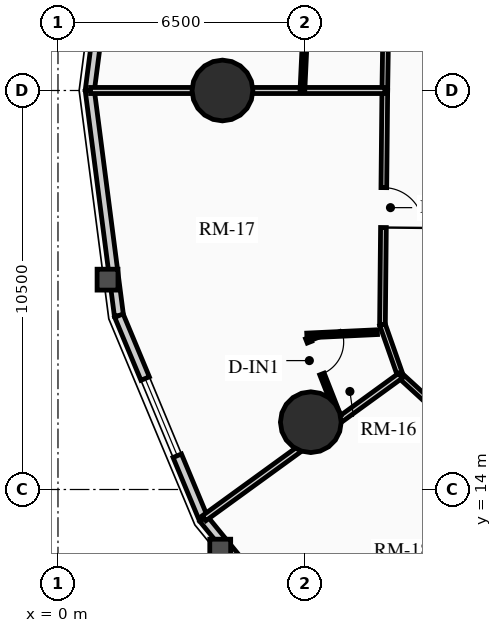
"""IFC4 building model, lengths in metres.
Left out: names, types, materials, properties, quantities, classifications, styles, units other than length and angle.
Written with IfcOpenShell. Run it as: python <this file> out.ifc"""

import sys

from ifc_helpers import new_model, si_unit, direction, frame, frame_2d, origin, origin_2d, place, context, subcontext, project, spatial, rectangle, circle, extrude, source, transform, mapped, element, fill, save


model = new_model("IFC4")
c1 = context("Model", 3, precision=1e-05, world=origin(), true_north=direction((0.0, 1.0)))
c2 = subcontext(c1, "Body", "Model", "MODEL_VIEW")
j1 = project(units=[si_unit("LENGTHUNIT", "METRE"), si_unit("PLANEANGLEUNIT", "RADIAN")], contexts=[c1])
p1 = place(None, origin())
s1 = spatial("IfcSite", under=j1, at=p1, CompositionType="ELEMENT")
p2 = place(p1, origin())
s2 = spatial("IfcBuilding", under=s1, at=p2, CompositionType="ELEMENT")
p3 = place(p2, frame((0.0, 0.0, 62.74)))
s3 = spatial("IfcBuildingStorey", under=s2, at=p3, CompositionType="ELEMENT", Elevation=62.74)
for number, where, z_axis, x_axis in (
    (1, (4.328, 24.5, 0.0), (0.0, 0.0, 1.0), (1.0, 0.0, 0.0)),
    (2, (6.653, 15.771, 0.0), (0.0, 0.0, 1.0), (1.0, 0.0, 0.0)),
):
    element("IfcColumn", number, at=place(p3, frame(where, z_axis=z_axis, x_axis=x_axis)), inside=s3, PredefinedType="USERDEFINED", context=c2, shape_type="SweptSolid", body=[
        extrude(circle(Radius=0.8, at=origin_2d()), origin(), (0.0, 0.0, 1.0), 2.91),
    ])
p4 = place(p3, frame((0.837, 24.5, 0.0), z_axis=(0.0, 0.0, 1.0), x_axis=(0.128339641463, 0.991730274031, 0.0)))
e3 = element("IfcWall", 3, at=p4, inside=s3, PredefinedType="SOLIDWALL", context=c2, shape_type="SweptSolid", body=[
    extrude(rectangle(XDim=5.973, YDim=0.24, at=frame_2d((2.987, 0.0))), origin(), (0.0, 0.0, 1.0), 2.079),
])
m1 = source(origin(), c2, "Body", "SweptSolid", [
    extrude(rectangle(XDim=1.9, YDim=1.35, at=frame_2d((0.95, 0.675))), frame((0.0, 0.13, 0.0), z_axis=(0.0, -1.0, 0.0), x_axis=(1.0, 0.0, 0.0)), (0.0, 0.0, 1.0), 0.26),
])
p5 = place(p4, frame((2.037, 0.0, 0.65)))
e4 = element("IfcOpeningElement", 4, at=p5, cuts=e3, PredefinedType="OPENING", context=c2, shape_type="MappedRepresentation", body=[
    mapped(m1, transform((0.0, 0.0, 0.0), x_axis=(1.0, 0.0, 0.0), y_axis=(0.0, 1.0, 0.0), z_axis=(0.0, 0.0, 1.0), scale=1.0)),
])
p6 = place(p3, frame((1.604, 18.576, 0.0), z_axis=(0.0, 0.0, 1.0), x_axis=(-0.128339641463, 0.991730274031, 0.0)))
e5 = element("IfcWall", 5, at=p6, inside=s3, PredefinedType="SOLIDWALL", context=c2, shape_type="SweptSolid", body=[
    extrude(rectangle(XDim=5.973, YDim=0.24, at=frame_2d((2.987, 0.0))), origin(), (0.0, 0.0, 1.0), 2.079),
])
p7 = place(p3, frame((3.828, 13.232, 0.0), z_axis=(0.0, 0.0, 1.0), x_axis=(-0.384348836956, 0.923187939442, 0.0)))
e6 = element("IfcWall", 6, at=p7, inside=s3, PredefinedType="SOLIDWALL", context=c2, shape_type="SweptSolid", body=[
    extrude(rectangle(XDim=5.789, YDim=0.24, at=frame_2d((2.894, 0.0))), origin(), (0.0, 0.0, 1.0), 2.079),
])
m2 = source(origin(), c2, "Body", "SweptSolid", [
    extrude(rectangle(XDim=2.2, YDim=1.35, at=frame_2d((1.1, 0.675))), frame((0.0, 0.13, 0.0), z_axis=(0.0, -1.0, 0.0), x_axis=(1.0, 0.0, 0.0)), (0.0, 0.0, 1.0), 0.26),
])
p8 = place(p7, frame((1.794, 0.0, 0.65)))
e7 = element("IfcOpeningElement", 7, at=p8, cuts=e6, PredefinedType="OPENING", context=c2, shape_type="MappedRepresentation", body=[
    mapped(m2, transform((0.0, 0.0, 0.0), x_axis=(1.0, 0.0, 0.0), y_axis=(0.0, 1.0, 0.0), z_axis=(0.0, 0.0, 1.0), scale=1.0)),
])
p9 = place(p3, frame((7.293, 8.991, 0.0), z_axis=(0.0, 0.0, 1.0), x_axis=(-0.632713287022, 0.77438614168, 0.0)))
e8 = element("IfcWall", 8, at=p9, inside=s3, PredefinedType="SOLIDWALL", context=c2, shape_type="SweptSolid", body=[
    extrude(rectangle(XDim=5.477, YDim=0.24, at=frame_2d((2.738, 0.0))), origin(), (0.0, 0.0, 1.0), 2.079),
])
p10 = place(p3, frame((8.693, 30.544, 0.0), z_axis=(0.0, 0.0, 1.0), x_axis=(-0.015307007986, -0.99988284089, 0.0)))
e9 = element("IfcWall", 9, at=p10, inside=s3, PredefinedType="PARTITIONING", context=c2, shape_type="SweptSolid", body=[
    extrude(rectangle(XDim=6.045, YDim=0.15, at=frame_2d((3.022, 0.0))), origin(), (0.0, 0.0, 1.0), 2.555),
])
p11 = place(p3, frame((8.6, 24.5, 0.0), z_axis=(0.0, 0.0, 1.0), x_axis=(-0.010023665349, -0.999949761805, 0.0)))
e10 = element("IfcWall", 10, at=p11, inside=s3, PredefinedType="PARTITIONING", context=c2, shape_type="SweptSolid", body=[
    extrude(rectangle(XDim=6.162, YDim=0.15, at=frame_2d((3.081, 0.0))), origin(), (0.0, 0.0, 1.0), 2.079),
])
m3 = source(origin(), c2, "Body", "SweptSolid", [
    extrude(rectangle(XDim=1.05, YDim=2.015, at=frame_2d((0.525, 1.007))), frame((0.0, 0.085, 0.0), z_axis=(0.0, -1.0, 0.0), x_axis=(1.0, 0.0, 0.0)), (0.0, 0.0, 1.0), 0.17),
])
p12 = place(p11, frame((2.556, 0.0, 0.0)))
e11 = element("IfcOpeningElement", 11, at=p12, cuts=e10, PredefinedType="OPENING", context=c2, shape_type="MappedRepresentation", body=[
    mapped(m3, transform((0.0, 0.0, 0.0), x_axis=(1.0, 0.0, 0.0), y_axis=(0.0, 1.0, 0.0), z_axis=(0.0, 0.0, 1.0), scale=1.0)),
])
p13 = place(p3, frame((8.538, 18.338, 0.0), z_axis=(0.0, 0.0, 1.0), x_axis=(0.331358150167, -0.94350504838, 0.0)))
e12 = element("IfcWall", 12, at=p13, inside=s3, PredefinedType="PARTITIONING", context=c2, shape_type="SweptSolid", body=[
    extrude(rectangle(XDim=1.424, YDim=0.15, at=frame_2d((0.712, 0.0))), origin(), (0.0, 0.0, 1.0), 2.125),
])
p14 = place(p3, frame((9.01, 16.994, 0.0), z_axis=(0.0, 0.0, 1.0), x_axis=(0.737701798986, -0.67512669609, 0.0)))
e13 = element("IfcWall", 13, at=p14, inside=s3, PredefinedType="PARTITIONING", context=c2, shape_type="SweptSolid", body=[
    extrude(rectangle(XDim=1.498, YDim=0.15, at=frame_2d((0.749, 0.0))), origin(), (0.0, 0.0, 1.0), 2.079),
])
p15 = place(p3, frame((8.6, 24.5, 0.0), z_axis=(0.0, 0.0, 1.0), x_axis=(-1.0, 0.0, 0.0)))
e14 = element("IfcWall", 14, at=p15, inside=s3, PredefinedType="PARTITIONING", context=c2, shape_type="SweptSolid", body=[
    extrude(rectangle(XDim=7.743, YDim=0.16, at=frame_2d((3.872, 0.0))), origin(), (0.0, 0.0, 1.0), 2.079),
])
p16 = place(p3, frame((9.01, 16.994, 0.0), z_axis=(0.0, 0.0, 1.0), x_axis=(-0.809215422166, -0.58751204288, 0.0)))
e15 = element("IfcWall", 15, at=p16, inside=s3, PredefinedType="PARTITIONING", context=c2, shape_type="SweptSolid", body=[
    extrude(rectangle(XDim=6.384, YDim=0.16, at=frame_2d((3.192, 0.0))), origin(), (0.0, 0.0, 1.0), 2.079),
])
p17 = place(p3, frame((6.713, 30.509, 0.0), z_axis=(0.0, 0.0, 1.0), x_axis=(-0.046755247216, -0.998906375422, 0.0)))
e16 = element("IfcWall", 16, at=p17, inside=s3, PredefinedType="PARTITIONING", context=c2, shape_type="SweptSolid", body=[
    extrude(rectangle(XDim=6.015, YDim=0.125, at=frame_2d((3.008, 0.0))), origin(), (0.0, 0.0, 1.0), 2.555),
])
p18 = place(p3, frame((8.404, 18.14, 0.0), z_axis=(0.0, 0.0, 1.0), x_axis=(-0.998892680948, -0.047046912219, 0.0)))
e17 = element("IfcWall", 17, at=p18, inside=s3, PredefinedType="PARTITIONING", context=c2, shape_type="SweptSolid", body=[
    extrude(rectangle(XDim=1.858, YDim=0.125, at=frame_2d((0.929, 0.0))), origin(), (0.0, 0.0, 1.0), 2.125),
])
p19 = place(p3, frame((6.574, 17.989, 0.0), z_axis=(0.0, 0.0, 1.0), x_axis=(0.365563636102, -0.930786349255, 0.0)))
e18 = element("IfcWall", 18, at=p19, inside=s3, PredefinedType="PARTITIONING", context=c2, shape_type="SweptSolid", body=[
    extrude(rectangle(XDim=2.213, YDim=0.125, at=frame_2d((1.106, 0.0))), origin(), (0.0, 0.0, 1.0), 2.079),
])
m4 = source(origin(), c2, "Body", "SweptSolid", [
    extrude(rectangle(XDim=0.9, YDim=2.005, at=frame_2d((0.45, 1.002))), frame((0.0, 0.073, 0.0), z_axis=(0.0, -1.0, 0.0), x_axis=(1.0, 0.0, 0.0)), (0.0, 0.0, 1.0), 0.145),
])
p20 = place(p19, frame((0.12, 0.0, 0.0)))
e19 = element("IfcOpeningElement", 19, at=p20, cuts=e18, PredefinedType="OPENING", context=c2, shape_type="MappedRepresentation", body=[
    mapped(m4, transform((0.0, 0.0, 0.0), x_axis=(1.0, 0.0, 0.0), y_axis=(0.0, 1.0, 0.0), z_axis=(0.0, 0.0, 1.0), scale=1.0)),
])
m5 = source(origin(), c2, "Body", "SweptSolid", [
    extrude(rectangle(XDim=2.2, YDim=1.35, at=frame_2d((1.1, 0.675))), frame((0.0, 0.03, 0.0), z_axis=(0.0, -1.0, 0.0), x_axis=(1.0, 0.0, 0.0)), (0.0, 0.0, 1.0), 0.06),
])
p21 = place(p8, origin())
e20 = element("IfcWindow", 20, at=p21, inside=s3, PartitioningType="DOUBLE_PANEL_VERTICAL", PredefinedType="WINDOW", context=c2, shape_type="MappedRepresentation", body=[
    mapped(m5, transform((0.0, 0.0, 0.0), x_axis=(1.0, 0.0, 0.0), y_axis=(0.0, 1.0, 0.0), z_axis=(0.0, 0.0, 1.0), scale=1.0)),
])
fill(e7, e20)
m6 = source(origin(), c2, "Body", "SweptSolid", [
    extrude(rectangle(XDim=1.05, YDim=2.015, at=frame_2d((0.525, 1.007))), frame((0.0, 0.025, 0.0), z_axis=(0.0, -1.0, 0.0), x_axis=(1.0, 0.0, 0.0)), (0.0, 0.0, 1.0), 0.05),
])
p22 = place(p12, origin())
e21 = element("IfcDoor", 21, at=p22, inside=s3, OperationType="SINGLE_SWING_RIGHT", PredefinedType="DOOR", context=c2, shape_type="MappedRepresentation", body=[
    mapped(m6, transform((0.0, 0.0, 0.0), x_axis=(1.0, 0.0, 0.0), y_axis=(0.0, 1.0, 0.0), z_axis=(0.0, 0.0, 1.0), scale=1.0)),
])
fill(e11, e21)
m7 = source(origin(), c2, "Body", "SweptSolid", [
    extrude(rectangle(XDim=0.9, YDim=2.005, at=frame_2d((0.45, 1.002))), frame((0.0, 0.025, 0.0), z_axis=(0.0, -1.0, 0.0), x_axis=(1.0, 0.0, 0.0)), (0.0, 0.0, 1.0), 0.05),
])
p23 = place(p20, origin())
e22 = element("IfcDoor", 22, at=p23, inside=s3, OperationType="SINGLE_SWING_LEFT", PredefinedType="DOOR", context=c2, shape_type="MappedRepresentation", body=[
    mapped(m7, transform((0.0, 0.0, 0.0), x_axis=(1.0, 0.0, 0.0), y_axis=(0.0, 1.0, 0.0), z_axis=(0.0, 0.0, 1.0), scale=1.0)),
])
fill(e19, e22)
save(model, sys.argv[1])
